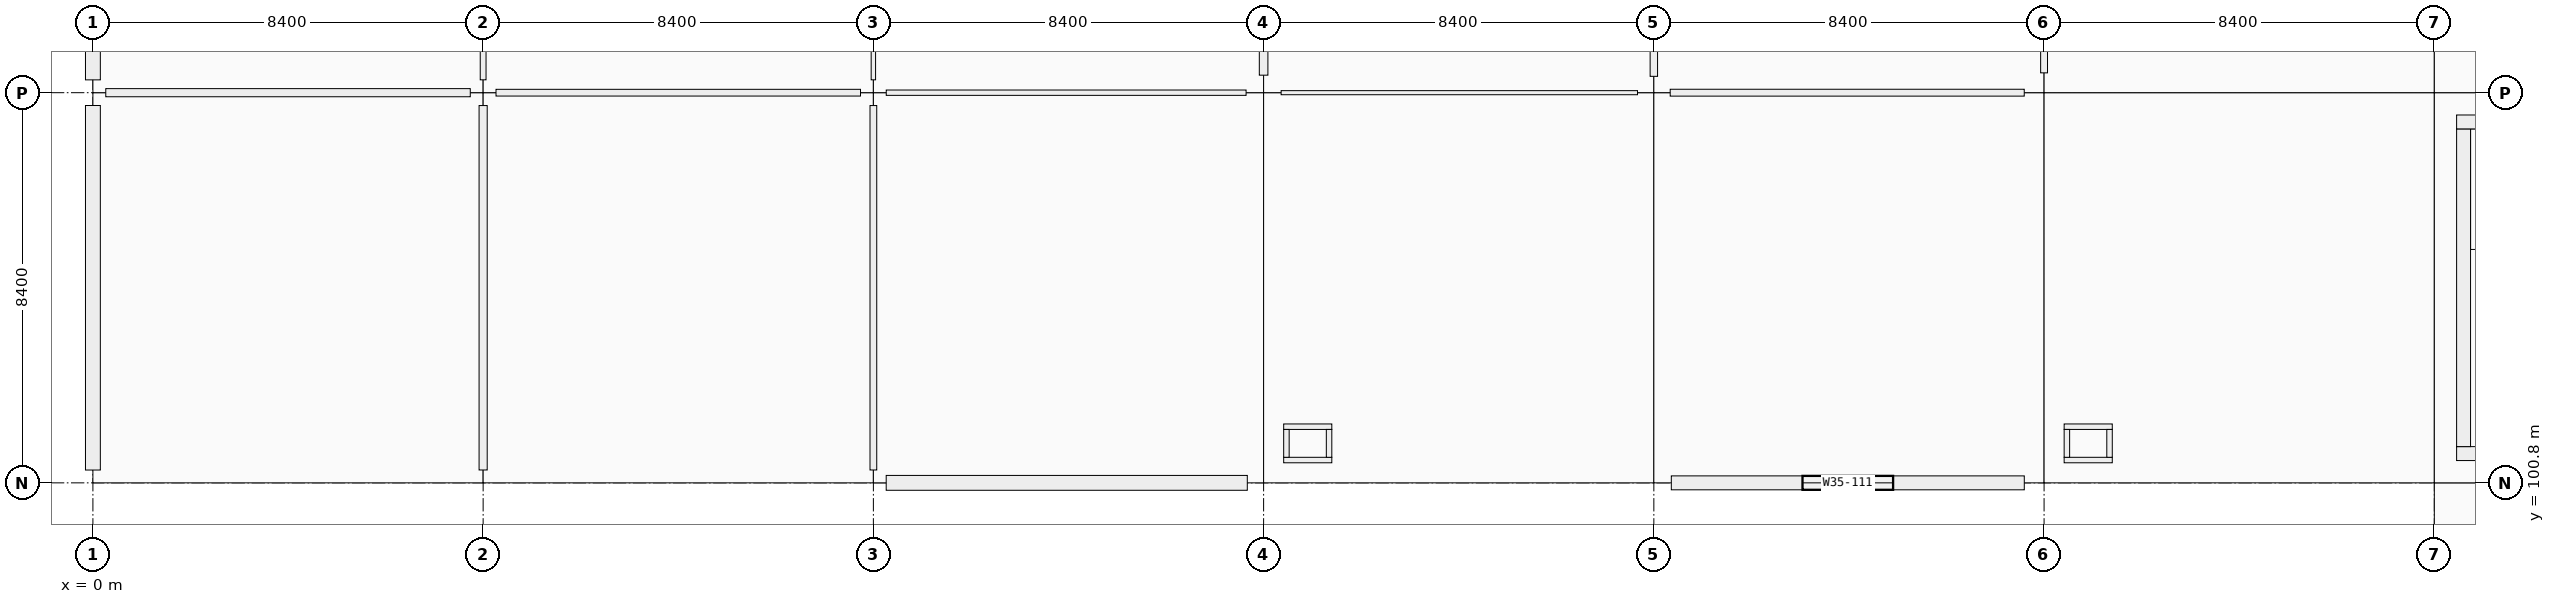
"""IFC4 building model, lengths in metres.
Left out: names, types, materials, properties, quantities, classifications, styles, units other than length and angle.
Written with IfcOpenShell. Run it as: python <this file> out.ifc"""

import sys

from ifc_helpers import new_model, si_unit, direction, frame, frame_2d, origin, origin_2d, place, context, subcontext, project, spatial, rectangle, extrude, element, fill, save


model = new_model("IFC4")
c1 = context("Model", 3, precision=1e-05, world=origin(), true_north=direction((0.0, 1.0)))
c2 = subcontext(c1, "Body", "Model", "MODEL_VIEW")
j1 = project(units=[si_unit("LENGTHUNIT", "METRE"), si_unit("PLANEANGLEUNIT", "RADIAN")], contexts=[c1])
p1 = place(None, origin())
s1 = spatial("IfcSite", under=j1, at=p1, CompositionType="ELEMENT")
p2 = place(p1, origin())
s2 = spatial("IfcBuilding", under=s1, at=p2, CompositionType="ELEMENT")
p3 = place(p2, frame((0.0, 0.0, 5.76)))
s3 = spatial("IfcBuildingStorey", under=s2, at=p3, CompositionType="ELEMENT", Elevation=5.76)
for number, where, z_axis, x_axis in (
    (1, (0.0, 100.8, 0.0), (0.0, 0.0, 1.0), (1.0, 0.0, 0.0)),
    (2, (0.0, 109.2, 0.0), (0.0, 0.0, 1.0), (1.0, 0.0, 0.0)),
    (3, (8.4, 100.8, 0.0), (0.0, 0.0, 1.0), (1.0, 0.0, 0.0)),
    (4, (8.4, 109.2, 0.0), (0.0, 0.0, 1.0), (1.0, 0.0, 0.0)),
    (5, (16.8, 100.8, 0.0), (0.0, 0.0, 1.0), (1.0, 0.0, 0.0)),
    (6, (16.8, 109.2, 0.0), (0.0, 0.0, 1.0), (1.0, 0.0, 0.0)),
):
    element("IfcColumn", number, at=place(p3, frame(where, z_axis=z_axis, x_axis=x_axis)), inside=s3, PredefinedType="COLUMN", context=c2, shape_type="SweptSolid", body=[
        extrude(rectangle(XDim=0.55, YDim=0.55, at=origin_2d()), origin(), (0.0, 0.0, 1.0), 4.2),
    ])
p4 = place(p3, frame((25.2, 100.8, 0.0), z_axis=(0.0, 0.0, 1.0), x_axis=(1.0, 0.0, 0.0)))
e7 = element("IfcColumn", 7, at=p4, inside=s3, PredefinedType="COLUMN", context=c2, shape_type="SweptSolid", body=[
    extrude(rectangle(XDim=0.7, YDim=0.7, at=origin_2d()), origin(), (0.0, 0.0, 1.0), 4.5),
])
for number, where, z_axis, x_axis in (
    (8, (25.2, 109.2, 0.0), (0.0, 0.0, 1.0), (1.0, 0.0, 0.0)),
    (9, (33.6, 100.8, 0.0), (0.0, 0.0, 1.0), (1.0, 0.0, 0.0)),
):
    element("IfcColumn", number, at=place(p3, frame(where, z_axis=z_axis, x_axis=x_axis)), inside=s3, PredefinedType="COLUMN", context=c2, shape_type="SweptSolid", body=[
        extrude(rectangle(XDim=0.75, YDim=0.75, at=origin_2d()), origin(), (0.0, 0.0, 1.0), 4.5),
    ])
p5 = place(p3, frame((33.6, 109.2, 0.0), z_axis=(0.0, 0.0, 1.0), x_axis=(1.0, 0.0, 0.0)))
e10 = element("IfcColumn", 10, at=p5, inside=s3, PredefinedType="COLUMN", context=c2, shape_type="SweptSolid", body=[
    extrude(rectangle(XDim=0.7, YDim=0.7, at=origin_2d()), origin(), (0.0, 0.0, 1.0), 4.5),
])
for number, where, z_axis, x_axis in (
    (11, (42.0, 100.8, 0.0), (0.0, 0.0, 1.0), (1.0, 0.0, 0.0)),
    (12, (42.0, 109.2, 0.0), (0.0, 0.0, 1.0), (1.0, 0.0, 0.0)),
):
    element("IfcColumn", number, at=place(p3, frame(where, z_axis=z_axis, x_axis=x_axis)), inside=s3, PredefinedType="COLUMN", context=c2, shape_type="SweptSolid", body=[
        extrude(rectangle(XDim=0.85, YDim=0.85, at=origin_2d()), origin(), (0.0, 0.0, 1.0), 4.5),
    ])
for number, where, z_axis, x_axis in (
    (13, (50.4, 100.8, 0.0), (0.0, 0.0, 1.0), (1.0, 0.0, 0.0)),
    (14, (50.4, 109.2, 0.0), (0.0, 0.0, 1.0), (1.0, 0.0, 0.0)),
):
    element("IfcColumn", number, at=place(p3, frame(where, z_axis=z_axis, x_axis=x_axis)), inside=s3, PredefinedType="COLUMN", context=c2, shape_type="SweptSolid", body=[
        extrude(rectangle(XDim=0.9, YDim=0.9, at=origin_2d()), origin(), (0.0, 0.0, 1.0), 4.5),
    ])
p6 = place(p3, frame((0.0, 101.076, 0.0), z_axis=(0.0, 0.0, 1.0), x_axis=(0.0, 1.0, 0.0)))
e15 = element("IfcWall", 15, at=p6, inside=s3, PredefinedType="SOLIDWALL", context=c2, shape_type="SweptSolid", body=[
    extrude(rectangle(XDim=7.848, YDim=0.32, at=frame_2d((3.924, 0.0))), origin(), (0.0, 0.0, 1.0), 3.4),
])
p7 = place(p6, frame((3.124, 0.0, 0.9)))
e16 = element("IfcOpeningElement", 16, at=p7, cuts=e15, PredefinedType="OPENING", context=c2, shape_type="SweptSolid", body=[
    extrude(rectangle(XDim=1.6, YDim=2.25, at=frame_2d((0.8, 1.125))), frame((0.0, 0.16, 0.0), z_axis=(0.0, -1.0, 0.0), x_axis=(1.0, 0.0, 0.0)), (0.0, 0.0, 1.0), 0.32),
])
p8 = place(p3, frame((0.0, 109.476, 0.0), z_axis=(0.0, 0.0, 1.0), x_axis=(0.0, 1.0, 0.0)))
e17 = element("IfcWall", 17, at=p8, inside=s3, PredefinedType="SOLIDWALL", context=c2, shape_type="SweptSolid", body=[
    extrude(rectangle(XDim=7.848, YDim=0.32, at=frame_2d((3.924, 0.0))), origin(), (0.0, 0.0, 1.0), 3.4),
])
p9 = place(p3, frame((24.849, 100.8, 0.0), z_axis=(0.0, 0.0, 1.0), x_axis=(-1.0, 0.0, 0.0)))
e18 = element("IfcWall", 18, at=p9, inside=s3, PredefinedType="SOLIDWALL", context=c2, shape_type="SweptSolid", body=[
    extrude(rectangle(XDim=7.773, YDim=0.32, at=frame_2d((3.887, 0.0))), origin(), (0.0, 0.0, 1.0), 3.4),
])
p10 = place(p9, frame((3.436, 0.0, 0.9)))
e19 = element("IfcOpeningElement", 19, at=p10, cuts=e18, PredefinedType="OPENING", context=c2, shape_type="SweptSolid", body=[
    extrude(rectangle(XDim=0.9, YDim=1.5, at=frame_2d((0.45, 0.75))), frame((0.0, 0.16, 0.0), z_axis=(0.0, -1.0, 0.0), x_axis=(1.0, 0.0, 0.0)), (0.0, 0.0, 1.0), 0.32),
])
p11 = place(p3, frame((41.574, 100.8, 0.0), z_axis=(0.0, 0.0, 1.0), x_axis=(-1.0, 0.0, 0.0)))
e20 = element("IfcWall", 20, at=p11, inside=s3, PredefinedType="SOLIDWALL", context=c2, shape_type="SweptSolid", body=[
    extrude(rectangle(XDim=7.598, YDim=0.3, at=frame_2d((3.799, 0.0))), origin(), (0.0, 0.0, 1.0), 3.4),
])
p12 = place(p11, frame((2.824, 0.0, 0.9)))
e21 = element("IfcOpeningElement", 21, at=p12, cuts=e20, PredefinedType="OPENING", context=c2, shape_type="SweptSolid", body=[
    extrude(rectangle(XDim=1.95, YDim=1.6, at=frame_2d((0.975, 0.8))), frame((0.0, 0.15, 0.0), z_axis=(0.0, -1.0, 0.0), x_axis=(1.0, 0.0, 0.0)), (0.0, 0.0, 1.0), 0.3),
])
p13 = place(p3, frame((58.32, 101.43, 0.0), z_axis=(0.0, 0.0, 1.0), x_axis=(-1.0, 0.0, 0.0)))
e22 = element("IfcWall", 22, at=p13, inside=s3, PredefinedType="SHEAR", context=c2, shape_type="SweptSolid", body=[
    extrude(rectangle(XDim=7.44, YDim=0.3, at=frame_2d((3.72, 0.0))), origin(), (0.0, 0.0, 1.0), 4.5),
])
p14 = place(p13, frame((1.28, 0.0, 0.0)))
e23 = element("IfcOpeningElement", 23, at=p14, cuts=e22, PredefinedType="OPENING", context=c2, shape_type="SweptSolid", body=[
    extrude(rectangle(XDim=1.5, YDim=2.15, at=frame_2d((0.75, 1.075))), frame((0.0, 0.15, 0.0), z_axis=(0.0, -1.0, 0.0), x_axis=(1.0, 0.0, 0.0)), (0.0, 0.0, 1.0), 0.3),
])
p15 = place(p3, frame((51.03, 101.58, 0.0), z_axis=(0.0, 0.0, 1.0), x_axis=(0.0, 1.0, 0.0)))
e24 = element("IfcWall", 24, at=p15, inside=s3, PredefinedType="SHEAR", context=c2, shape_type="SweptSolid", body=[
    extrude(rectangle(XDim=6.84, YDim=0.3, at=frame_2d((3.42, 0.0))), origin(), (0.0, 0.0, 1.0), 4.5),
])
p16 = place(p3, frame((50.88, 108.57, 0.0), z_axis=(0.0, 0.0, 1.0), x_axis=(1.0, 0.0, 0.0)))
e25 = element("IfcWall", 25, at=p16, inside=s3, PredefinedType="SHEAR", context=c2, shape_type="SweptSolid", body=[
    extrude(rectangle(XDim=7.44, YDim=0.3, at=frame_2d((3.72, 0.0))), origin(), (0.0, 0.0, 1.0), 4.5),
])
for number, where, z_axis, x_axis in (
    (26, (25.632, 101.291, 0.0), (0.0, 0.0, 1.0), (1.0, 0.0, 0.0)),
    (27, (25.632, 102.009, 0.0), (0.0, 0.0, 1.0), (1.0, 0.0, 0.0)),
):
    element("IfcWall", number, at=place(p3, frame(where, z_axis=z_axis, x_axis=x_axis)), inside=s3, PredefinedType="PARTITIONING", context=c2, shape_type="SweptSolid", body=[
        extrude(rectangle(XDim=1.036, YDim=0.118, at=frame_2d((0.518, 0.0))), origin(), (0.0, 0.0, 1.0), 3.48),
    ])
for number, where, z_axis, x_axis in (
    (28, (25.691, 101.35, 0.0), (0.0, 0.0, 1.0), (0.0, 1.0, 0.0)),
    (29, (26.609, 101.35, 0.0), (0.0, 0.0, 1.0), (0.0, 1.0, 0.0)),
):
    element("IfcWall", number, at=place(p3, frame(where, z_axis=z_axis, x_axis=x_axis)), inside=s3, PredefinedType="PARTITIONING", context=c2, shape_type="SweptSolid", body=[
        extrude(rectangle(XDim=0.6, YDim=0.118, at=frame_2d((0.3, 0.0))), origin(), (0.0, 0.0, 1.0), 3.48),
    ])
for number, where, z_axis, x_axis in (
    (30, (42.432, 101.291, 0.0), (0.0, 0.0, 1.0), (1.0, 0.0, 0.0)),
    (31, (42.432, 102.009, 0.0), (0.0, 0.0, 1.0), (1.0, 0.0, 0.0)),
):
    element("IfcWall", number, at=place(p3, frame(where, z_axis=z_axis, x_axis=x_axis)), inside=s3, PredefinedType="PARTITIONING", context=c2, shape_type="SweptSolid", body=[
        extrude(rectangle(XDim=1.036, YDim=0.118, at=frame_2d((0.518, 0.0))), origin(), (0.0, 0.0, 1.0), 3.48),
    ])
for number, where, z_axis, x_axis in (
    (32, (42.491, 101.35, 0.0), (0.0, 0.0, 1.0), (0.0, 1.0, 0.0)),
    (33, (43.409, 101.35, 0.0), (0.0, 0.0, 1.0), (0.0, 1.0, 0.0)),
):
    element("IfcWall", number, at=place(p3, frame(where, z_axis=z_axis, x_axis=x_axis)), inside=s3, PredefinedType="PARTITIONING", context=c2, shape_type="SweptSolid", body=[
        extrude(rectangle(XDim=0.6, YDim=0.118, at=frame_2d((0.3, 0.0))), origin(), (0.0, 0.0, 1.0), 3.48),
    ])
p17 = place(p3, frame((0.277, 109.2, 0.0), z_axis=(0.0, 0.0, 1.0), x_axis=(1.0, 0.0, 0.0)))
e34 = element("IfcWall", 34, at=p17, inside=s3, PredefinedType="PARTITIONING", context=c2, shape_type="SweptSolid", body=[
    extrude(rectangle(XDim=7.846, YDim=0.175, at=frame_2d((3.923, 0.0))), origin(), (0.0, 0.0, 1.0), 2.4),
])
p18 = place(p17, frame((3.443, 0.0, 0.0)))
e35 = element("IfcOpeningElement", 35, at=p18, cuts=e34, PredefinedType="OPENING", context=c2, shape_type="SweptSolid", body=[
    extrude(rectangle(XDim=0.96, YDim=2.18, at=frame_2d((0.48, 1.09))), frame((0.0, 0.087, 0.0), z_axis=(0.0, -1.0, 0.0), x_axis=(1.0, 0.0, 0.0)), (0.0, 0.0, 1.0), 0.175),
])
p19 = place(p3, frame((8.677, 109.2, 0.0), z_axis=(0.0, 0.0, 1.0), x_axis=(1.0, 0.0, 0.0)))
e36 = element("IfcWall", 36, at=p19, inside=s3, PredefinedType="PARTITIONING", context=c2, shape_type="SweptSolid", body=[
    extrude(rectangle(XDim=7.846, YDim=0.145, at=frame_2d((3.923, 0.0))), origin(), (0.0, 0.0, 1.0), 2.4),
])
p20 = place(p19, frame((3.463, 0.0, 0.0)))
e37 = element("IfcOpeningElement", 37, at=p20, cuts=e36, PredefinedType="OPENING", context=c2, shape_type="SweptSolid", body=[
    extrude(rectangle(XDim=0.92, YDim=2.15, at=frame_2d((0.46, 1.075))), frame((0.0, 0.073, 0.0), z_axis=(0.0, -1.0, 0.0), x_axis=(1.0, 0.0, 0.0)), (0.0, 0.0, 1.0), 0.145),
])
p21 = place(p3, frame((17.077, 109.2, 0.0), z_axis=(0.0, 0.0, 1.0), x_axis=(1.0, 0.0, 0.0)))
e38 = element("IfcWall", 38, at=p21, inside=s3, PredefinedType="PARTITIONING", context=c2, shape_type="SweptSolid", body=[
    extrude(rectangle(XDim=7.746, YDim=0.115, at=frame_2d((3.873, 0.0))), origin(), (0.0, 0.0, 1.0), 2.4),
])
p22 = place(p21, frame((3.368, 0.0, 0.0)))
e39 = element("IfcOpeningElement", 39, at=p22, cuts=e38, PredefinedType="OPENING", context=c2, shape_type="SweptSolid", body=[
    extrude(rectangle(XDim=1.01, YDim=2.12, at=frame_2d((0.505, 1.06))), frame((0.0, 0.058, 0.0), z_axis=(0.0, -1.0, 0.0), x_axis=(1.0, 0.0, 0.0)), (0.0, 0.0, 1.0), 0.115),
])
p23 = place(p3, frame((25.577, 109.2, 0.0), z_axis=(0.0, 0.0, 1.0), x_axis=(1.0, 0.0, 0.0)))
e40 = element("IfcWall", 40, at=p23, inside=s3, PredefinedType="PARTITIONING", context=c2, shape_type="SweptSolid", body=[
    extrude(rectangle(XDim=7.671, YDim=0.088, at=frame_2d((3.835, 0.0))), origin(), (0.0, 0.0, 1.0), 2.4),
])
p24 = place(p23, frame((3.351, 0.0, 0.0)))
e41 = element("IfcOpeningElement", 41, at=p24, cuts=e40, PredefinedType="OPENING", context=c2, shape_type="SweptSolid", body=[
    extrude(rectangle(XDim=0.97, YDim=2.12, at=frame_2d((0.485, 1.06))), frame((0.0, 0.044, 0.0), z_axis=(0.0, -1.0, 0.0), x_axis=(1.0, 0.0, 0.0)), (0.0, 0.0, 1.0), 0.088),
])
p25 = place(p3, frame((33.952, 109.2, 0.0), z_axis=(0.0, 0.0, 1.0), x_axis=(1.0, 0.0, 0.0)))
e42 = element("IfcWall", 42, at=p25, inside=s3, PredefinedType="PARTITIONING", context=c2, shape_type="SweptSolid", body=[
    extrude(rectangle(XDim=7.621, YDim=0.148, at=frame_2d((3.811, 0.0))), origin(), (0.0, 0.0, 1.0), 2.4),
])
p26 = place(p3, frame((8.4, 101.077, 0.0), z_axis=(0.0, 0.0, 1.0), x_axis=(0.0, 1.0, 0.0)))
e43 = element("IfcWall", 43, at=p26, inside=s3, PredefinedType="PARTITIONING", context=c2, shape_type="SweptSolid", body=[
    extrude(rectangle(XDim=7.846, YDim=0.175, at=frame_2d((3.923, 0.0))), origin(), (0.0, 0.0, 1.0), 2.4),
])
p27 = place(p26, frame((3.433, 0.0, 0.0)))
e44 = element("IfcOpeningElement", 44, at=p27, cuts=e43, PredefinedType="OPENING", context=c2, shape_type="SweptSolid", body=[
    extrude(rectangle(XDim=0.98, YDim=2.18, at=frame_2d((0.49, 1.09))), frame((0.0, 0.087, 0.0), z_axis=(0.0, -1.0, 0.0), x_axis=(1.0, 0.0, 0.0)), (0.0, 0.0, 1.0), 0.175),
])
p28 = place(p3, frame((8.4, 109.477, 0.0), z_axis=(0.0, 0.0, 1.0), x_axis=(0.0, 1.0, 0.0)))
e45 = element("IfcWall", 45, at=p28, inside=s3, PredefinedType="PARTITIONING", context=c2, shape_type="SweptSolid", body=[
    extrude(rectangle(XDim=7.846, YDim=0.125, at=frame_2d((3.923, 0.0))), origin(), (0.0, 0.0, 1.0), 2.4),
])
p29 = place(p28, frame((3.453, 0.0, 0.0)))
e46 = element("IfcOpeningElement", 46, at=p29, cuts=e45, PredefinedType="OPENING", context=c2, shape_type="SweptSolid", body=[
    extrude(rectangle(XDim=0.94, YDim=2.15, at=frame_2d((0.47, 1.075))), frame((0.0, 0.062, 0.0), z_axis=(0.0, -1.0, 0.0), x_axis=(1.0, 0.0, 0.0)), (0.0, 0.0, 1.0), 0.125),
])
p30 = place(p3, frame((16.8, 101.077, 0.0), z_axis=(0.0, 0.0, 1.0), x_axis=(0.0, 1.0, 0.0)))
e47 = element("IfcWall", 47, at=p30, inside=s3, PredefinedType="PARTITIONING", context=c2, shape_type="SweptSolid", body=[
    extrude(rectangle(XDim=7.846, YDim=0.145, at=frame_2d((3.923, 0.0))), origin(), (0.0, 0.0, 1.0), 2.4),
])
p31 = place(p30, frame((3.383, 0.0, 0.0)))
e48 = element("IfcOpeningElement", 48, at=p31, cuts=e47, PredefinedType="OPENING", context=c2, shape_type="SweptSolid", body=[
    extrude(rectangle(XDim=1.08, YDim=2.22, at=frame_2d((0.54, 1.11))), frame((0.0, 0.073, 0.0), z_axis=(0.0, -1.0, 0.0), x_axis=(1.0, 0.0, 0.0)), (0.0, 0.0, 1.0), 0.145),
])
p32 = place(p3, frame((16.8, 109.477, 0.0), z_axis=(0.0, 0.0, 1.0), x_axis=(0.0, 1.0, 0.0)))
e49 = element("IfcWall", 49, at=p32, inside=s3, PredefinedType="PARTITIONING", context=c2, shape_type="SweptSolid", body=[
    extrude(rectangle(XDim=7.846, YDim=0.095, at=frame_2d((3.923, 0.0))), origin(), (0.0, 0.0, 1.0), 2.4),
])
p33 = place(p32, frame((3.458, 0.0, 0.0)))
e50 = element("IfcOpeningElement", 50, at=p33, cuts=e49, PredefinedType="OPENING", context=c2, shape_type="SweptSolid", body=[
    extrude(rectangle(XDim=0.93, YDim=2.12, at=frame_2d((0.465, 1.06))), frame((0.0, 0.047, 0.0), z_axis=(0.0, -1.0, 0.0), x_axis=(1.0, 0.0, 0.0)), (0.0, 0.0, 1.0), 0.095),
])
p34 = place(p3, frame((25.2, 109.577, 0.0), z_axis=(0.0, 0.0, 1.0), x_axis=(0.0, 1.0, 0.0)))
e51 = element("IfcWall", 51, at=p34, inside=s3, PredefinedType="PARTITIONING", context=c2, shape_type="SweptSolid", body=[
    extrude(rectangle(XDim=7.671, YDim=0.185, at=frame_2d((3.835, 0.0))), origin(), (0.0, 0.0, 1.0), 2.4),
])
p35 = place(p34, frame((3.336, 0.0, 0.0)))
e52 = element("IfcOpeningElement", 52, at=p35, cuts=e51, PredefinedType="OPENING", context=c2, shape_type="SweptSolid", body=[
    extrude(rectangle(XDim=1.0, YDim=2.2, at=frame_2d((0.5, 1.1))), frame((0.0, 0.093, 0.0), z_axis=(0.0, -1.0, 0.0), x_axis=(1.0, 0.0, 0.0)), (0.0, 0.0, 1.0), 0.185),
])
p36 = place(p3, frame((33.6, 109.552, 0.0), z_axis=(0.0, 0.0, 1.0), x_axis=(0.0, 1.0, 0.0)))
e53 = element("IfcWall", 53, at=p36, inside=s3, PredefinedType="PARTITIONING", context=c2, shape_type="SweptSolid", body=[
    extrude(rectangle(XDim=7.671, YDim=0.16, at=frame_2d((3.835, 0.0))), origin(), (0.0, 0.0, 1.0), 2.4),
])
p37 = place(p3, frame((42.0, 109.627, 0.0), z_axis=(0.0, 0.0, 1.0), x_axis=(0.0, 1.0, 0.0)))
e54 = element("IfcWall", 54, at=p37, inside=s3, PredefinedType="PARTITIONING", context=c2, shape_type="SweptSolid", body=[
    extrude(rectangle(XDim=7.671, YDim=0.148, at=frame_2d((3.835, 0.0))), origin(), (0.0, 0.0, 1.0), 2.4),
])
p38 = place(p37, frame((0.713, 0.0, 0.0)))
e55 = element("IfcOpeningElement", 55, at=p38, cuts=e54, PredefinedType="OPENING", context=c2, shape_type="SweptSolid", body=[
    extrude(rectangle(XDim=1.1, YDim=2.15, at=frame_2d((0.55, 1.075))), frame((0.0, 0.074, 0.0), z_axis=(0.0, -1.0, 0.0), x_axis=(1.0, 0.0, 0.0)), (0.0, 0.0, 1.0), 0.148),
])
p39 = place(p37, frame((4.658, 0.0, 0.0)))
e56 = element("IfcOpeningElement", 56, at=p39, cuts=e54, PredefinedType="OPENING", context=c2, shape_type="SweptSolid", body=[
    extrude(rectangle(XDim=1.05, YDim=2.15, at=frame_2d((0.525, 1.075))), frame((0.0, 0.074, 0.0), z_axis=(0.0, -1.0, 0.0), x_axis=(1.0, 0.0, 0.0)), (0.0, 0.0, 1.0), 0.148),
])
p40 = place(p7, origin())
e57 = element("IfcWindow", 57, at=p40, inside=s3, PartitioningType="SINGLE_PANEL", PredefinedType="WINDOW", context=c2, shape_type="SweptSolid", body=[
    extrude(rectangle(XDim=1.6, YDim=2.25, at=frame_2d((0.8, 1.125))), frame((0.0, 0.03, 0.0), z_axis=(0.0, -1.0, 0.0), x_axis=(1.0, 0.0, 0.0)), (0.0, 0.0, 1.0), 0.06),
])
fill(e16, e57)
p41 = place(p10, origin())
e58 = element("IfcWindow", 58, at=p41, inside=s3, PartitioningType="SINGLE_PANEL", PredefinedType="WINDOW", context=c2, shape_type="SweptSolid", body=[
    extrude(rectangle(XDim=0.9, YDim=1.5, at=frame_2d((0.45, 0.75))), frame((0.0, 0.03, 0.0), z_axis=(0.0, -1.0, 0.0), x_axis=(1.0, 0.0, 0.0)), (0.0, 0.0, 1.0), 0.06),
])
fill(e19, e58)
p42 = place(p12, origin())
e59 = element("IfcWindow", 59, at=p42, inside=s3, PartitioningType="SINGLE_PANEL", PredefinedType="WINDOW", context=c2, shape_type="SweptSolid", body=[
    extrude(rectangle(XDim=1.95, YDim=1.6, at=frame_2d((0.975, 0.8))), frame((0.0, 0.03, 0.0), z_axis=(0.0, -1.0, 0.0), x_axis=(1.0, 0.0, 0.0)), (0.0, 0.0, 1.0), 0.06),
])
fill(e21, e59)
p43 = place(p22, origin())
e60 = element("IfcDoor", 60, at=p43, inside=s3, OperationType="SINGLE_SWING_RIGHT", PredefinedType="DOOR", context=c2, shape_type="SweptSolid", body=[
    extrude(rectangle(XDim=1.01, YDim=2.12, at=frame_2d((0.505, 1.06))), frame((0.0, 0.025, 0.0), z_axis=(0.0, -1.0, 0.0), x_axis=(1.0, 0.0, 0.0)), (0.0, 0.0, 1.0), 0.05),
])
fill(e39, e60)
p44 = place(p24, origin())
e61 = element("IfcDoor", 61, at=p44, inside=s3, OperationType="SINGLE_SWING_LEFT", PredefinedType="DOOR", context=c2, shape_type="SweptSolid", body=[
    extrude(rectangle(XDim=0.97, YDim=2.12, at=frame_2d((0.485, 1.06))), frame((0.0, 0.025, 0.0), z_axis=(0.0, -1.0, 0.0), x_axis=(1.0, 0.0, 0.0)), (0.0, 0.0, 1.0), 0.05),
])
fill(e41, e61)
p45 = place(p31, origin())
e62 = element("IfcDoor", 62, at=p45, inside=s3, OperationType="SINGLE_SWING_RIGHT", PredefinedType="DOOR", context=c2, shape_type="SweptSolid", body=[
    extrude(rectangle(XDim=1.08, YDim=2.22, at=frame_2d((0.54, 1.11))), frame((0.0, 0.025, 0.0), z_axis=(0.0, -1.0, 0.0), x_axis=(1.0, 0.0, 0.0)), (0.0, 0.0, 1.0), 0.05),
])
fill(e48, e62)
p46 = place(p18, origin())
e63 = element("IfcDoor", 63, at=p46, inside=s3, OperationType="SINGLE_SWING_LEFT", PredefinedType="DOOR", context=c2, shape_type="SweptSolid", body=[
    extrude(rectangle(XDim=0.96, YDim=2.18, at=frame_2d((0.48, 1.09))), frame((0.0, 0.025, 0.0), z_axis=(0.0, -1.0, 0.0), x_axis=(1.0, 0.0, 0.0)), (0.0, 0.0, 1.0), 0.05),
])
fill(e35, e63)
p47 = place(p20, origin())
e64 = element("IfcDoor", 64, at=p47, inside=s3, OperationType="SINGLE_SWING_LEFT", PredefinedType="DOOR", context=c2, shape_type="SweptSolid", body=[
    extrude(rectangle(XDim=0.92, YDim=2.15, at=frame_2d((0.46, 1.075))), frame((0.0, 0.025, 0.0), z_axis=(0.0, -1.0, 0.0), x_axis=(1.0, 0.0, 0.0)), (0.0, 0.0, 1.0), 0.05),
])
fill(e37, e64)
p48 = place(p27, origin())
e65 = element("IfcDoor", 65, at=p48, inside=s3, OperationType="SINGLE_SWING_LEFT", PredefinedType="DOOR", context=c2, shape_type="SweptSolid", body=[
    extrude(rectangle(XDim=0.98, YDim=2.18, at=frame_2d((0.49, 1.09))), frame((0.0, 0.025, 0.0), z_axis=(0.0, -1.0, 0.0), x_axis=(1.0, 0.0, 0.0)), (0.0, 0.0, 1.0), 0.05),
])
fill(e44, e65)
save(model, sys.argv[1])
